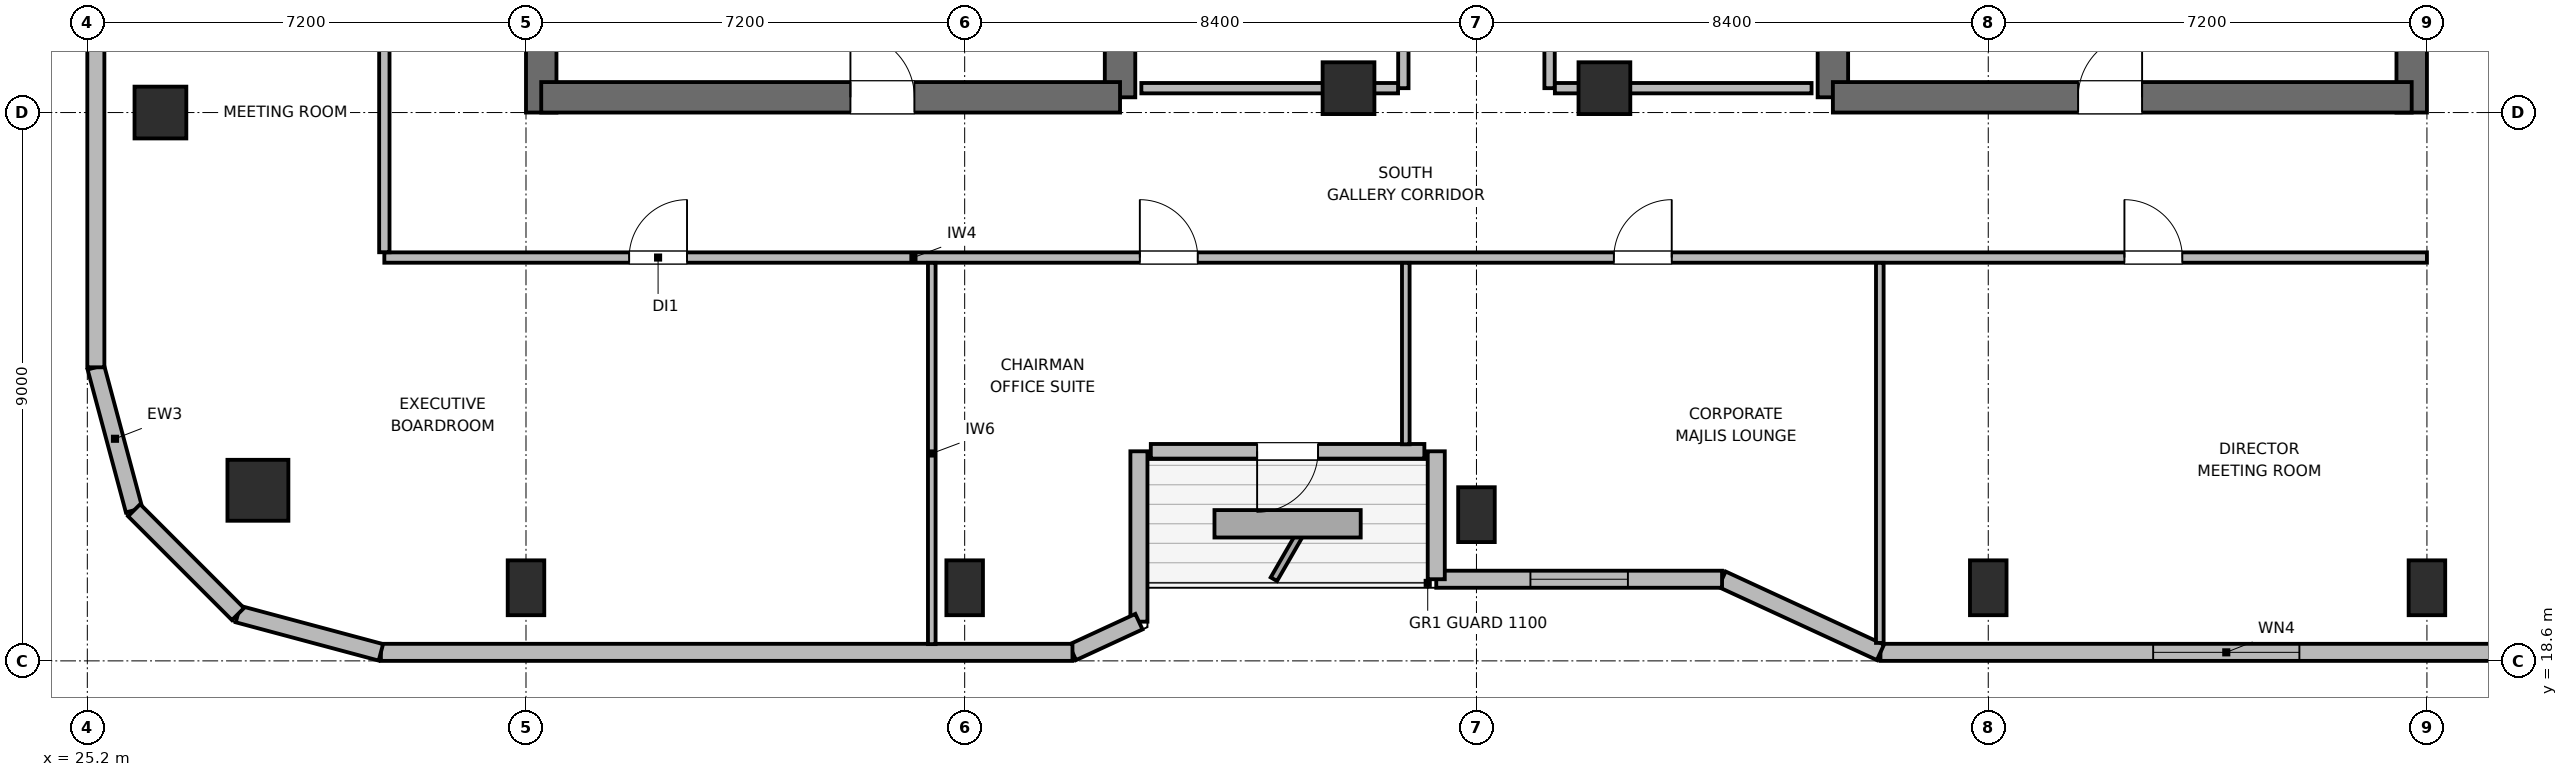
"""IFC4 building model, lengths in metres.
Left out: names, types, materials, properties, quantities, classifications, styles, units other than length and angle.
Written with IfcOpenShell. Run it as: python <this file> out.ifc"""

import sys

from ifc_helpers import new_model, si_unit, direction, frame, frame_2d, origin, origin_2d, place, context, subcontext, project, spatial, rectangle, circle, extrude, element, fill, save


model = new_model("IFC4")
c1 = context("Model", 3, precision=1e-05, world=origin(), true_north=direction((0.0, 1.0)))
c2 = subcontext(c1, "Body", "Model", "MODEL_VIEW")
j1 = project(units=[si_unit("LENGTHUNIT", "METRE"), si_unit("PLANEANGLEUNIT", "RADIAN")], contexts=[c1])
p1 = place(None, origin())
s1 = spatial("IfcSite", under=j1, at=p1, CompositionType="ELEMENT")
p2 = place(p1, origin())
s2 = spatial("IfcBuilding", under=s1, at=p2, CompositionType="ELEMENT")
p3 = place(p2, frame((0.0, 0.0, 337.5)))
s3 = spatial("IfcBuildingStorey", under=s2, at=p3, CompositionType="ELEMENT", Elevation=337.5)
p4 = place(p3, frame((32.65, 27.6, 0.0), z_axis=(0.0, 0.0, 1.0), x_axis=(0.0, 1.0, 0.0)))
e1 = element("IfcWall", 1, at=p4, inside=s3, PredefinedType="SHEAR", context=c2, shape_type="SweptSolid", body=[
    extrude(rectangle(XDim=16.8, YDim=0.5, at=frame_2d((8.4, 0.0))), origin(), (0.0, 0.0, 1.0), 4.5),
])
p5 = place(p3, frame((42.15, 27.85, 0.0), z_axis=(0.0, 0.0, 1.0), x_axis=(0.0, 1.0, 0.0)))
e2 = element("IfcWall", 2, at=p5, inside=s3, PredefinedType="SHEAR", context=c2, shape_type="SweptSolid", body=[
    extrude(rectangle(XDim=6.55, YDim=0.5, at=frame_2d((3.275, 0.0))), origin(), (0.0, 0.0, 1.0), 4.5),
])
p6 = place(p3, frame((32.65, 27.85, 0.0), z_axis=(0.0, 0.0, 1.0), x_axis=(1.0, 0.0, 0.0)))
e3 = element("IfcWall", 3, at=p6, inside=s3, PredefinedType="SHEAR", context=c2, shape_type="SweptSolid", body=[
    extrude(rectangle(XDim=9.5, YDim=0.5, at=frame_2d((4.75, 0.0))), origin(), (0.0, 0.0, 1.0), 4.5),
])
p7 = place(p6, frame((5.075, 0.0, 0.0)))
e4 = element("IfcOpeningElement", 4, at=p7, cuts=e3, PredefinedType="OPENING", context=c2, shape_type="SweptSolid", body=[
    extrude(rectangle(XDim=1.05, YDim=2.04, at=frame_2d((0.525, 1.02))), frame((0.0, 0.26, 0.0), z_axis=(0.0, -1.0, 0.0), x_axis=(1.0, 0.0, 0.0)), (0.0, 0.0, 1.0), 0.52),
])
p8 = place(p3, frame((53.85, 27.85, 0.0), z_axis=(0.0, 0.0, 1.0), x_axis=(0.0, 1.0, 0.0)))
e5 = element("IfcWall", 5, at=p8, inside=s3, PredefinedType="SHEAR", context=c2, shape_type="SweptSolid", body=[
    extrude(rectangle(XDim=7.95, YDim=0.5, at=frame_2d((3.975, 0.0))), origin(), (0.0, 0.0, 1.0), 4.5),
])
p9 = place(p3, frame((63.35, 27.6, 0.0), z_axis=(0.0, 0.0, 1.0), x_axis=(0.0, 1.0, 0.0)))
e6 = element("IfcWall", 6, at=p9, inside=s3, PredefinedType="SHEAR", context=c2, shape_type="SweptSolid", body=[
    extrude(rectangle(XDim=16.8, YDim=0.5, at=frame_2d((8.4, 0.0))), origin(), (0.0, 0.0, 1.0), 4.5),
])
p10 = place(p3, frame((53.85, 27.85, 0.0), z_axis=(0.0, 0.0, 1.0), x_axis=(1.0, 0.0, 0.0)))
e7 = element("IfcWall", 7, at=p10, inside=s3, PredefinedType="SHEAR", context=c2, shape_type="SweptSolid", body=[
    extrude(rectangle(XDim=9.5, YDim=0.5, at=frame_2d((4.75, 0.0))), origin(), (0.0, 0.0, 1.0), 4.5),
])
p11 = place(p10, frame((4.025, 0.0, 0.0)))
e8 = element("IfcOpeningElement", 8, at=p11, cuts=e7, PredefinedType="OPENING", context=c2, shape_type="SweptSolid", body=[
    extrude(rectangle(XDim=1.05, YDim=2.04, at=frame_2d((0.525, 1.02))), frame((0.0, 0.26, 0.0), z_axis=(0.0, -1.0, 0.0), x_axis=(1.0, 0.0, 0.0)), (0.0, 0.0, 1.0), 0.52),
])
p12 = place(p3, frame((28.0, 21.4, 0.0), z_axis=(0.0, 0.0, 1.0), x_axis=(1.0, 0.0, 0.0)))
e9 = element("IfcColumn", 9, at=p12, inside=s3, PredefinedType="COLUMN", context=c2, shape_type="SweptSolid", body=[
    extrude(circle(Radius=0.5, at=origin_2d()), origin(), (0.0, 0.0, 1.0), 4.5),
])
for number, where, z_axis, x_axis in (
    (10, (32.4, 19.8, 0.0), (0.0, 0.0, 1.0), (1.0, 0.0, 0.0)),
    (11, (39.6, 19.8, 0.0), (0.0, 0.0, 1.0), (1.0, 0.0, 0.0)),
    (12, (48.0, 21.0, 0.0), (0.0, 0.0, 1.0), (1.0, 0.0, 0.0)),
    (13, (56.4, 19.8, 0.0), (0.0, 0.0, 1.0), (1.0, 0.0, 0.0)),
    (14, (63.6, 19.8, 0.0), (0.0, 0.0, 1.0), (1.0, 0.0, 0.0)),
):
    element("IfcColumn", number, at=place(p3, frame(where, z_axis=z_axis, x_axis=x_axis)), inside=s3, PredefinedType="COLUMN", context=c2, shape_type="SweptSolid", body=[
        extrude(rectangle(XDim=0.6, YDim=0.9, at=origin_2d()), origin(), (0.0, 0.0, 1.0), 4.5),
    ])
for number, where, z_axis, x_axis in (
    (15, (26.4, 27.6, 0.0), (0.0, 0.0, 1.0), (1.0, 0.0, 0.0)),
    (16, (45.9, 28.0, 0.0), (0.0, 0.0, 1.0), (1.0, 0.0, 0.0)),
    (17, (50.1, 28.0, 0.0), (0.0, 0.0, 1.0), (1.0, 0.0, 0.0)),
):
    element("IfcColumn", number, at=place(p3, frame(where, z_axis=z_axis, x_axis=x_axis)), inside=s3, PredefinedType="COLUMN", context=c2, shape_type="SweptSolid", body=[
        extrude(rectangle(XDim=0.85, YDim=0.85, at=origin_2d()), origin(), (0.0, 0.0, 1.0), 4.5),
    ])
p13 = place(p3, frame((25.969, 21.073, 0.0), z_axis=(0.0, 0.0, 1.0), x_axis=(-0.258751159445, 0.965944013639, 0.0)))
e18 = element("IfcWall", 18, at=p13, inside=s3, PredefinedType="SOLIDWALL", context=c2, shape_type="SweptSolid", body=[
    extrude(rectangle(XDim=2.429, YDim=0.28, at=frame_2d((1.214, 0.0))), origin(), (0.0, 0.0, 1.0), 4.28),
])
p14 = place(p3, frame((25.34, 23.418, 0.0), z_axis=(0.0, 0.0, 1.0), x_axis=(0.0, 1.0, 0.0)))
e19 = element("IfcWall", 19, at=p14, inside=s3, PredefinedType="SOLIDWALL", context=c2, shape_type="SweptSolid", body=[
    extrude(rectangle(XDim=5.842, YDim=0.28, at=frame_2d((2.921, 0.0))), origin(), (0.0, 0.0, 1.0), 4.28),
])
p15 = place(p3, frame((65.982, 18.74, 0.0), z_axis=(0.0, 0.0, 1.0), x_axis=(-1.0, 0.0, 0.0)))
e20 = element("IfcWall", 20, at=p15, inside=s3, PredefinedType="SOLIDWALL", context=c2, shape_type="SweptSolid", body=[
    extrude(rectangle(XDim=11.351, YDim=0.28, at=frame_2d((5.676, 0.0))), origin(), (0.0, 0.0, 1.0), 4.28),
])
p16 = place(p15, frame((4.475, 0.0, 0.85)))
e21 = element("IfcOpeningElement", 21, at=p16, cuts=e20, PredefinedType="OPENING", context=c2, shape_type="SweptSolid", body=[
    extrude(rectangle(XDim=2.4, YDim=1.15, at=frame_2d((1.2, 0.575))), frame((0.0, 0.15, 0.0), z_axis=(0.0, -1.0, 0.0), x_axis=(1.0, 0.0, 0.0)), (0.0, 0.0, 1.0), 0.3),
])
p17 = place(p3, frame((54.631, 18.74, 0.0), z_axis=(0.0, 0.0, 1.0), x_axis=(-0.907956889006, 0.419063584324, 0.0)))
e22 = element("IfcWall", 22, at=p17, inside=s3, PredefinedType="SOLIDWALL", context=c2, shape_type="SweptSolid", body=[
    extrude(rectangle(XDim=2.864, YDim=0.28, at=frame_2d((1.432, 0.0))), origin(), (0.0, 0.0, 1.0), 2.865),
])
p18 = place(p3, frame((52.031, 19.94, 0.0), z_axis=(0.0, 0.0, 1.0), x_axis=(-1.0, 0.0, 0.0)))
e23 = element("IfcWall", 23, at=p18, inside=s3, PredefinedType="SOLIDWALL", context=c2, shape_type="SweptSolid", body=[
    extrude(rectangle(XDim=4.691, YDim=0.28, at=frame_2d((2.345, 0.0))), origin(), (0.0, 0.0, 1.0), 2.865),
])
p19 = place(p18, frame((1.545, 0.0, 0.85)))
e24 = element("IfcOpeningElement", 24, at=p19, cuts=e23, PredefinedType="OPENING", context=c2, shape_type="SweptSolid", body=[
    extrude(rectangle(XDim=1.6, YDim=1.0, at=frame_2d((0.8, 0.5))), frame((0.0, 0.15, 0.0), z_axis=(0.0, -1.0, 0.0), x_axis=(1.0, 0.0, 0.0)), (0.0, 0.0, 1.0), 0.3),
])
p20 = place(p3, frame((47.34, 19.94, 0.0), z_axis=(0.0, 0.0, 1.0), x_axis=(0.0, 1.0, 0.0)))
e25 = element("IfcWall", 25, at=p20, inside=s3, PredefinedType="SOLIDWALL", context=c2, shape_type="SweptSolid", body=[
    extrude(rectangle(XDim=2.1, YDim=0.28, at=frame_2d((1.05, 0.0))), origin(), (0.0, 0.0, 1.0), 2.865),
])
p21 = place(p3, frame((47.145, 22.04, 0.0), z_axis=(0.0, 0.0, 1.0), x_axis=(-1.0, 0.0, 0.0)))
e26 = element("IfcWall", 26, at=p21, inside=s3, PredefinedType="SOLIDWALL", context=c2, shape_type="SweptSolid", body=[
    extrude(rectangle(XDim=4.49, YDim=0.24, at=frame_2d((2.245, 0.0))), origin(), (0.0, 0.0, 1.0), 4.28),
])
p22 = place(p21, frame((1.745, 0.0, 0.0)))
e27 = element("IfcOpeningElement", 27, at=p22, cuts=e26, PredefinedType="OPENING", context=c2, shape_type="SweptSolid", body=[
    extrude(rectangle(XDim=1.0, YDim=2.02, at=frame_2d((0.5, 1.01))), frame((0.0, 0.13, 0.0), z_axis=(0.0, -1.0, 0.0), x_axis=(1.0, 0.0, 0.0)), (0.0, 0.0, 1.0), 0.26),
])
p23 = place(p3, frame((42.46, 22.04, 0.0), z_axis=(0.0, 0.0, 1.0), x_axis=(0.0, -1.0, 0.0)))
e28 = element("IfcWall", 28, at=p23, inside=s3, PredefinedType="SOLIDWALL", context=c2, shape_type="SweptSolid", body=[
    extrude(rectangle(XDim=2.796, YDim=0.28, at=frame_2d((1.398, 0.0))), origin(), (0.0, 0.0, 1.0), 2.865),
])
p24 = place(p3, frame((42.46, 19.244, 0.0), z_axis=(0.0, 0.0, 1.0), x_axis=(-0.907893953211, -0.419199916176, 0.0)))
e29 = element("IfcWall", 29, at=p24, inside=s3, PredefinedType="SOLIDWALL", context=c2, shape_type="SweptSolid", body=[
    extrude(rectangle(XDim=1.201, YDim=0.28, at=frame_2d((0.601, 0.0))), origin(), (0.0, 0.0, 1.0), 4.28),
])
p25 = place(p3, frame((41.369, 18.74, 0.0), z_axis=(0.0, 0.0, 1.0), x_axis=(-1.0, 0.0, 0.0)))
e30 = element("IfcWall", 30, at=p25, inside=s3, PredefinedType="SOLIDWALL", context=c2, shape_type="SweptSolid", body=[
    extrude(rectangle(XDim=11.351, YDim=0.28, at=frame_2d((5.675, 0.0))), origin(), (0.0, 0.0, 1.0), 4.28),
])
p26 = place(p3, frame((30.018, 18.74, 0.0), z_axis=(0.0, 0.0, 1.0), x_axis=(-0.965937282298, 0.25877628691, 0.0)))
e31 = element("IfcWall", 31, at=p26, inside=s3, PredefinedType="SOLIDWALL", context=c2, shape_type="SweptSolid", body=[
    extrude(rectangle(XDim=2.428, YDim=0.28, at=frame_2d((1.214, 0.0))), origin(), (0.0, 0.0, 1.0), 4.28),
])
p27 = place(p3, frame((27.673, 19.368, 0.0), z_axis=(0.0, 0.0, 1.0), x_axis=(-0.707106781187, 0.707106781187, 0.0)))
e32 = element("IfcWall", 32, at=p27, inside=s3, PredefinedType="SOLIDWALL", context=c2, shape_type="SweptSolid", body=[
    extrude(rectangle(XDim=2.41, YDim=0.28, at=frame_2d((1.205, 0.0))), origin(), (0.0, 0.0, 1.0), 4.28),
])
p28 = place(p3, frame((46.8, 28.0, 0.0), z_axis=(0.0, 0.0, 1.0), x_axis=(0.0, 1.0, 0.0)))
e33 = element("IfcWall", 33, at=p28, inside=s3, PredefinedType="PARTITIONING", context=c2, shape_type="SweptSolid", body=[
    extrude(rectangle(XDim=4.5, YDim=0.17, at=frame_2d((2.25, 0.0))), origin(), (0.0, 0.0, 1.0), 4.28),
])
p29 = place(p28, frame((0.99, 0.0, 0.0)))
e34 = element("IfcOpeningElement", 34, at=p29, cuts=e33, PredefinedType="OPENING", context=c2, shape_type="SweptSolid", body=[
    extrude(rectangle(XDim=0.9, YDim=2.02, at=frame_2d((0.45, 1.01))), frame((0.0, 0.095, 0.0), z_axis=(0.0, -1.0, 0.0), x_axis=(1.0, 0.0, 0.0)), (0.0, 0.0, 1.0), 0.19),
])
p30 = place(p28, frame((3.24, 0.0, 0.0)))
e35 = element("IfcOpeningElement", 35, at=p30, cuts=e33, PredefinedType="OPENING", context=c2, shape_type="SweptSolid", body=[
    extrude(rectangle(XDim=0.9, YDim=2.02, at=frame_2d((0.45, 1.01))), frame((0.0, 0.095, 0.0), z_axis=(0.0, -1.0, 0.0), x_axis=(1.0, 0.0, 0.0)), (0.0, 0.0, 1.0), 0.19),
])
p31 = place(p3, frame((42.5, 28.0, 0.0), z_axis=(0.0, 0.0, 1.0), x_axis=(1.0, 0.0, 0.0)))
e36 = element("IfcWall", 36, at=p31, inside=s3, PredefinedType="PARTITIONING", context=c2, shape_type="SweptSolid", body=[
    extrude(rectangle(XDim=4.213, YDim=0.17, at=frame_2d((2.106, 0.0))), origin(), (0.0, 0.0, 1.0), 3.365),
])
p32 = place(p3, frame((49.2, 28.0, 0.0), z_axis=(0.0, 0.0, 1.0), x_axis=(0.0, 1.0, 0.0)))
e37 = element("IfcWall", 37, at=p32, inside=s3, PredefinedType="PARTITIONING", context=c2, shape_type="SweptSolid", body=[
    extrude(rectangle(XDim=4.5, YDim=0.17, at=frame_2d((2.25, 0.0))), origin(), (0.0, 0.0, 1.0), 4.28),
])
p33 = place(p32, frame((0.675, 0.0, 0.0)))
e38 = element("IfcOpeningElement", 38, at=p33, cuts=e37, PredefinedType="OPENING", context=c2, shape_type="SweptSolid", body=[
    extrude(rectangle(XDim=0.9, YDim=2.02, at=frame_2d((0.45, 1.01))), frame((0.0, 0.095, 0.0), z_axis=(0.0, -1.0, 0.0), x_axis=(1.0, 0.0, 0.0)), (0.0, 0.0, 1.0), 0.19),
])
p34 = place(p32, frame((2.925, 0.0, 0.0)))
e39 = element("IfcOpeningElement", 39, at=p34, cuts=e37, PredefinedType="OPENING", context=c2, shape_type="SweptSolid", body=[
    extrude(rectangle(XDim=0.9, YDim=2.02, at=frame_2d((0.45, 1.01))), frame((0.0, 0.095, 0.0), z_axis=(0.0, -1.0, 0.0), x_axis=(1.0, 0.0, 0.0)), (0.0, 0.0, 1.0), 0.19),
])
p35 = place(p3, frame((49.287, 28.0, 0.0), z_axis=(0.0, 0.0, 1.0), x_axis=(1.0, 0.0, 0.0)))
e40 = element("IfcWall", 40, at=p35, inside=s3, PredefinedType="PARTITIONING", context=c2, shape_type="SweptSolid", body=[
    extrude(rectangle(XDim=4.213, YDim=0.17, at=frame_2d((2.106, 0.0))), origin(), (0.0, 0.0, 1.0), 3.365),
])
p36 = place(p3, frame((30.075, 25.22, 0.0), z_axis=(0.0, 0.0, 1.0), x_axis=(1.0, 0.0, 0.0)))
e41 = element("IfcWall", 41, at=p36, inside=s3, PredefinedType="PARTITIONING", context=c2, shape_type="SweptSolid", body=[
    extrude(rectangle(XDim=33.525, YDim=0.17, at=frame_2d((16.763, 0.0))), origin(), (0.0, 0.0, 1.0), 4.28),
])
p37 = place(p36, frame((4.018, 0.0, 0.0)))
e42 = element("IfcOpeningElement", 42, at=p37, cuts=e41, PredefinedType="OPENING", context=c2, shape_type="SweptSolid", body=[
    extrude(rectangle(XDim=0.95, YDim=2.04, at=frame_2d((0.475, 1.02))), frame((0.0, 0.095, 0.0), z_axis=(0.0, -1.0, 0.0), x_axis=(1.0, 0.0, 0.0)), (0.0, 0.0, 1.0), 0.19),
])
p38 = place(p36, frame((12.4, 0.0, 0.0)))
e43 = element("IfcOpeningElement", 43, at=p38, cuts=e41, PredefinedType="OPENING", context=c2, shape_type="SweptSolid", body=[
    extrude(rectangle(XDim=0.95, YDim=2.04, at=frame_2d((0.475, 1.02))), frame((0.0, 0.095, 0.0), z_axis=(0.0, -1.0, 0.0), x_axis=(1.0, 0.0, 0.0)), (0.0, 0.0, 1.0), 0.19),
])
p39 = place(p36, frame((20.18, 0.0, 0.0)))
e44 = element("IfcOpeningElement", 44, at=p39, cuts=e41, PredefinedType="OPENING", context=c2, shape_type="SweptSolid", body=[
    extrude(rectangle(XDim=0.95, YDim=2.04, at=frame_2d((0.475, 1.02))), frame((0.0, 0.095, 0.0), z_axis=(0.0, -1.0, 0.0), x_axis=(1.0, 0.0, 0.0)), (0.0, 0.0, 1.0), 0.19),
])
p40 = place(p36, frame((28.56, 0.0, 0.0)))
e45 = element("IfcOpeningElement", 45, at=p40, cuts=e41, PredefinedType="OPENING", context=c2, shape_type="SweptSolid", body=[
    extrude(rectangle(XDim=0.95, YDim=2.04, at=frame_2d((0.475, 1.02))), frame((0.0, 0.095, 0.0), z_axis=(0.0, -1.0, 0.0), x_axis=(1.0, 0.0, 0.0)), (0.0, 0.0, 1.0), 0.19),
])
p41 = place(p3, frame((30.075, 25.307, 0.0), z_axis=(0.0, 0.0, 1.0), x_axis=(0.0, 1.0, 0.0)))
e46 = element("IfcWall", 46, at=p41, inside=s3, PredefinedType="PARTITIONING", context=c2, shape_type="SweptSolid", body=[
    extrude(rectangle(XDim=21.386, YDim=0.17, at=frame_2d((10.693, 0.0))), origin(), (0.0, 0.0, 1.0), 4.28),
])
p42 = place(p41, frame((4.428, 0.0, 0.0)))
e47 = element("IfcOpeningElement", 47, at=p42, cuts=e46, PredefinedType="OPENING", context=c2, shape_type="SweptSolid", body=[
    extrude(rectangle(XDim=0.95, YDim=2.04, at=frame_2d((0.475, 1.02))), frame((0.0, 0.095, 0.0), z_axis=(0.0, -1.0, 0.0), x_axis=(1.0, 0.0, 0.0)), (0.0, 0.0, 1.0), 0.19),
])
p43 = place(p41, frame((15.208, 0.0, 0.0)))
e48 = element("IfcOpeningElement", 48, at=p43, cuts=e46, PredefinedType="OPENING", context=c2, shape_type="SweptSolid", body=[
    extrude(rectangle(XDim=0.95, YDim=2.04, at=frame_2d((0.475, 1.02))), frame((0.0, 0.095, 0.0), z_axis=(0.0, -1.0, 0.0), x_axis=(1.0, 0.0, 0.0)), (0.0, 0.0, 1.0), 0.19),
])
p44 = place(p3, frame((39.06, 18.875, 0.0), z_axis=(0.0, 0.0, 1.0), x_axis=(0.0, 1.0, 0.0)))
e49 = element("IfcWall", 49, at=p44, inside=s3, PredefinedType="PARTITIONING", context=c2, shape_type="SweptSolid", body=[
    extrude(rectangle(XDim=6.258, YDim=0.125, at=frame_2d((3.129, 0.0))), origin(), (0.0, 0.0, 1.0), 4.28),
])
p45 = place(p3, frame((46.84, 22.155, 0.0), z_axis=(0.0, 0.0, 1.0), x_axis=(0.0, 1.0, 0.0)))
e50 = element("IfcWall", 50, at=p45, inside=s3, PredefinedType="PARTITIONING", context=c2, shape_type="SweptSolid", body=[
    extrude(rectangle(XDim=2.978, YDim=0.125, at=frame_2d((1.489, 0.0))), origin(), (0.0, 0.0, 1.0), 4.28),
])
p46 = place(p3, frame((54.62, 18.895, 0.0), z_axis=(0.0, 0.0, 1.0), x_axis=(0.0, 1.0, 0.0)))
e51 = element("IfcWall", 51, at=p46, inside=s3, PredefinedType="PARTITIONING", context=c2, shape_type="SweptSolid", body=[
    extrude(rectangle(XDim=6.238, YDim=0.125, at=frame_2d((3.119, 0.0))), origin(), (0.0, 0.0, 1.0), 3.643),
])
p47 = place(p16, origin())
e52 = element("IfcWindow", 52, at=p47, inside=s3, PartitioningType="SINGLE_PANEL", PredefinedType="WINDOW", context=c2, shape_type="SweptSolid", body=[
    extrude(rectangle(XDim=2.4, YDim=1.15, at=frame_2d((1.2, 0.575))), frame((0.0, 0.03, 0.0), z_axis=(0.0, -1.0, 0.0), x_axis=(1.0, 0.0, 0.0)), (0.0, 0.0, 1.0), 0.06),
])
fill(e21, e52)
p48 = place(p19, origin())
e53 = element("IfcWindow", 53, at=p48, inside=s3, PartitioningType="SINGLE_PANEL", PredefinedType="WINDOW", context=c2, shape_type="SweptSolid", body=[
    extrude(rectangle(XDim=1.6, YDim=1.0, at=frame_2d((0.8, 0.5))), frame((0.0, 0.03, 0.0), z_axis=(0.0, -1.0, 0.0), x_axis=(1.0, 0.0, 0.0)), (0.0, 0.0, 1.0), 0.06),
])
fill(e24, e53)
p49 = place(p22, origin())
e54 = element("IfcDoor", 54, at=p49, inside=s3, OperationType="SINGLE_SWING_RIGHT", PredefinedType="DOOR", context=c2, shape_type="SweptSolid", body=[
    extrude(rectangle(XDim=1.0, YDim=2.02, at=frame_2d((0.5, 1.01))), frame((0.0, 0.025, 0.0), z_axis=(0.0, -1.0, 0.0), x_axis=(1.0, 0.0, 0.0)), (0.0, 0.0, 1.0), 0.05),
])
fill(e27, e54)
p50 = place(p7, origin())
e55 = element("IfcDoor", 55, at=p50, inside=s3, OperationType="SINGLE_SWING_LEFT", PredefinedType="DOOR", context=c2, shape_type="SweptSolid", body=[
    extrude(rectangle(XDim=1.05, YDim=2.04, at=frame_2d((0.525, 1.02))), frame((0.0, 0.025, 0.0), z_axis=(0.0, -1.0, 0.0), x_axis=(1.0, 0.0, 0.0)), (0.0, 0.0, 1.0), 0.05),
])
fill(e4, e55)
p51 = place(p11, origin())
e56 = element("IfcDoor", 56, at=p51, inside=s3, OperationType="SINGLE_SWING_RIGHT", PredefinedType="DOOR", context=c2, shape_type="SweptSolid", body=[
    extrude(rectangle(XDim=1.05, YDim=2.04, at=frame_2d((0.525, 1.02))), frame((0.0, 0.025, 0.0), z_axis=(0.0, -1.0, 0.0), x_axis=(1.0, 0.0, 0.0)), (0.0, 0.0, 1.0), 0.05),
])
fill(e8, e56)
p52 = place(p37, origin())
e57 = element("IfcDoor", 57, at=p52, inside=s3, OperationType="SINGLE_SWING_RIGHT", PredefinedType="DOOR", context=c2, shape_type="SweptSolid", body=[
    extrude(rectangle(XDim=0.95, YDim=2.04, at=frame_2d((0.475, 1.02))), frame((0.0, 0.025, 0.0), z_axis=(0.0, -1.0, 0.0), x_axis=(1.0, 0.0, 0.0)), (0.0, 0.0, 1.0), 0.05),
])
fill(e42, e57)
p53 = place(p38, origin())
e58 = element("IfcDoor", 58, at=p53, inside=s3, OperationType="SINGLE_SWING_LEFT", PredefinedType="DOOR", context=c2, shape_type="SweptSolid", body=[
    extrude(rectangle(XDim=0.95, YDim=2.04, at=frame_2d((0.475, 1.02))), frame((0.0, 0.025, 0.0), z_axis=(0.0, -1.0, 0.0), x_axis=(1.0, 0.0, 0.0)), (0.0, 0.0, 1.0), 0.05),
])
fill(e43, e58)
p54 = place(p39, origin())
e59 = element("IfcDoor", 59, at=p54, inside=s3, OperationType="SINGLE_SWING_RIGHT", PredefinedType="DOOR", context=c2, shape_type="SweptSolid", body=[
    extrude(rectangle(XDim=0.95, YDim=2.04, at=frame_2d((0.475, 1.02))), frame((0.0, 0.025, 0.0), z_axis=(0.0, -1.0, 0.0), x_axis=(1.0, 0.0, 0.0)), (0.0, 0.0, 1.0), 0.05),
])
fill(e44, e59)
p55 = place(p40, origin())
e60 = element("IfcDoor", 60, at=p55, inside=s3, OperationType="SINGLE_SWING_LEFT", PredefinedType="DOOR", context=c2, shape_type="SweptSolid", body=[
    extrude(rectangle(XDim=0.95, YDim=2.04, at=frame_2d((0.475, 1.02))), frame((0.0, 0.025, 0.0), z_axis=(0.0, -1.0, 0.0), x_axis=(1.0, 0.0, 0.0)), (0.0, 0.0, 1.0), 0.05),
])
fill(e45, e60)
save(model, sys.argv[1])
